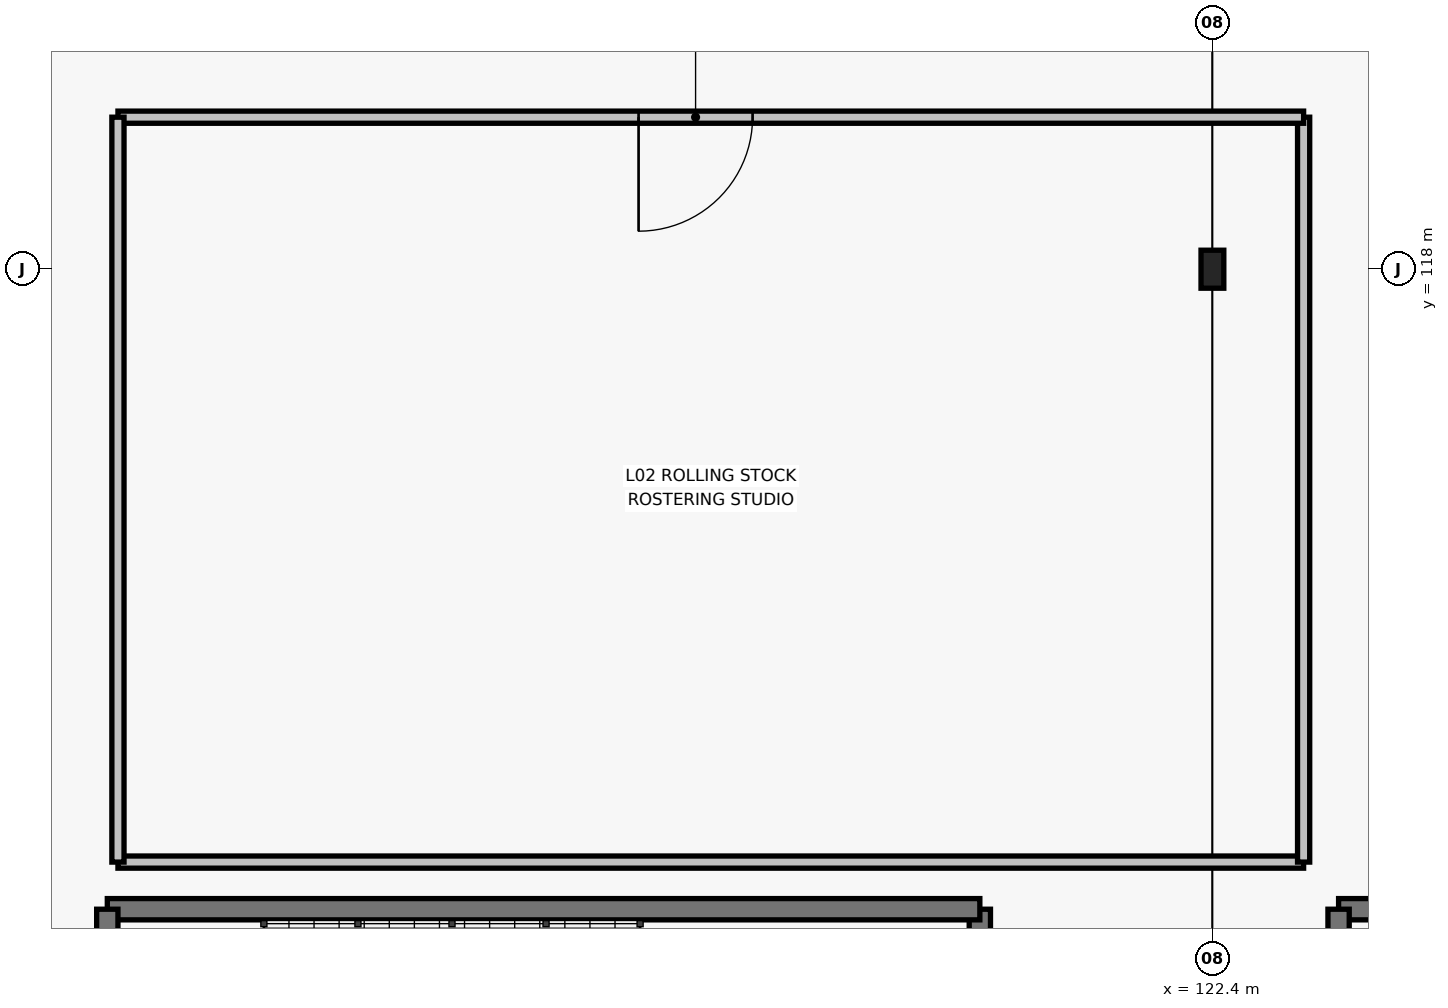
"""IFC4 building model, lengths in metres.
Left out: names, types, materials, properties, quantities, classifications, styles, units other than length and angle.
Written with IfcOpenShell. Run it as: python <this file> out.ifc"""

import sys

from ifc_helpers import new_model, si_unit, direction, frame, frame_2d, origin, origin_2d, place, context, subcontext, project, spatial, rectangle, i_section, extrude, element, fill, save


model = new_model("IFC4")
c1 = context("Model", 3, precision=1e-05, world=origin(), true_north=direction((0.0, 1.0)))
c2 = subcontext(c1, "Body", "Model", "MODEL_VIEW")
j1 = project(units=[si_unit("LENGTHUNIT", "METRE"), si_unit("PLANEANGLEUNIT", "RADIAN")], contexts=[c1])
p1 = place(None, origin())
s1 = spatial("IfcSite", under=j1, at=p1, CompositionType="ELEMENT")
p2 = place(p1, origin())
s2 = spatial("IfcBuilding", under=s1, at=p2, CompositionType="ELEMENT")
p3 = place(p2, frame((0.0, 0.0, 10.8)))
s3 = spatial("IfcBuildingStorey", under=s2, at=p3, CompositionType="ELEMENT", Elevation=10.8)
p4 = place(p3, frame((122.4, 118.0, 0.0), z_axis=(0.0, 0.0, 1.0), x_axis=(1.0, 0.0, 0.0)))
e1 = element("IfcColumn", 1, at=p4, inside=s3, PredefinedType="COLUMN", context=c2, shape_type="SweptSolid", body=[
    extrude(i_section(OverallWidth=0.3, OverallDepth=0.5, WebThickness=0.014, FlangeThickness=0.028, FilletRadius=0.027, at=origin_2d()), origin(), (0.0, 0.0, 1.0), 6.0),
])
p5 = place(p3, frame((119.34, 105.26, 0.0), z_axis=(0.0, 0.0, 1.0), x_axis=(0.0, 1.0, 0.0)))
e2 = element("IfcWall", 2, at=p5, inside=s3, PredefinedType="SHEAR", context=c2, shape_type="SweptSolid", body=[
    extrude(rectangle(XDim=4.32, YDim=0.28, at=frame_2d((2.16, 0.0))), origin(), (0.0, 0.0, 1.0), 5.8),
])
p6 = place(p3, frame((119.34, 109.58, 0.0), z_axis=(0.0, 0.0, 1.0), x_axis=(-1.0, 0.0, 0.0)))
e3 = element("IfcWall", 3, at=p6, inside=s3, PredefinedType="SHEAR", context=c2, shape_type="SweptSolid", body=[
    extrude(rectangle(XDim=11.48, YDim=0.28, at=frame_2d((5.74, 0.0))), origin(), (0.0, 0.0, 1.0), 5.8),
])
p7 = place(p3, frame((107.86, 109.58, 0.0), z_axis=(0.0, 0.0, 1.0), x_axis=(0.0, -1.0, 0.0)))
e4 = element("IfcWall", 4, at=p7, inside=s3, PredefinedType="SHEAR", context=c2, shape_type="SweptSolid", body=[
    extrude(rectangle(XDim=4.32, YDim=0.28, at=frame_2d((2.16, 0.0))), origin(), (0.0, 0.0, 1.0), 5.8),
])
p8 = place(p7, frame((1.585, 0.0, 0.0)))
e5 = element("IfcOpeningElement", 5, at=p8, cuts=e4, PredefinedType="OPENING", context=c2, shape_type="SweptSolid", body=[
    extrude(rectangle(XDim=1.15, YDim=2.2, at=frame_2d((0.575, 1.1))), frame((0.0, 0.15, 0.0), z_axis=(0.0, -1.0, 0.0), x_axis=(1.0, 0.0, 0.0)), (0.0, 0.0, 1.0), 0.3),
])
p9 = place(p3, frame((135.54, 109.58, 0.0), z_axis=(0.0, 0.0, 1.0), x_axis=(-1.0, 0.0, 0.0)))
e6 = element("IfcWall", 6, at=p9, inside=s3, PredefinedType="SHEAR", context=c2, shape_type="SweptSolid", body=[
    extrude(rectangle(XDim=11.48, YDim=0.28, at=frame_2d((5.74, 0.0))), origin(), (0.0, 0.0, 1.0), 5.8),
])
p10 = place(p3, frame((124.06, 109.58, 0.0), z_axis=(0.0, 0.0, 1.0), x_axis=(0.0, -1.0, 0.0)))
e7 = element("IfcWall", 7, at=p10, inside=s3, PredefinedType="SHEAR", context=c2, shape_type="SweptSolid", body=[
    extrude(rectangle(XDim=4.32, YDim=0.28, at=frame_2d((2.16, 0.0))), origin(), (0.0, 0.0, 1.0), 5.8),
])
p11 = place(p10, frame((1.585, 0.0, 0.0)))
e8 = element("IfcOpeningElement", 8, at=p11, cuts=e7, PredefinedType="OPENING", context=c2, shape_type="SweptSolid", body=[
    extrude(rectangle(XDim=1.15, YDim=2.2, at=frame_2d((0.575, 1.1))), frame((0.0, 0.15, 0.0), z_axis=(0.0, -1.0, 0.0), x_axis=(1.0, 0.0, 0.0)), (0.0, 0.0, 1.0), 0.3),
])
p12 = place(p3, frame((108.0, 110.2, 0.0), z_axis=(0.0, 0.0, 1.0), x_axis=(1.0, 0.0, 0.0)))
e9 = element("IfcWall", 9, at=p12, inside=s3, PredefinedType="PARTITIONING", context=c2, shape_type="SweptSolid", body=[
    extrude(rectangle(XDim=15.6, YDim=0.16, at=frame_2d((7.8, 0.0))), origin(), (0.0, 0.0, 1.0), 5.8),
])
p13 = place(p3, frame((123.6, 110.2, 0.0), z_axis=(0.0, 0.0, 1.0), x_axis=(0.0, 1.0, 0.0)))
e10 = element("IfcWall", 10, at=p13, inside=s3, PredefinedType="PARTITIONING", context=c2, shape_type="SweptSolid", body=[
    extrude(rectangle(XDim=9.8, YDim=0.16, at=frame_2d((4.9, 0.0))), origin(), (0.0, 0.0, 1.0), 5.8),
])
p14 = place(p3, frame((123.6, 120.0, 0.0), z_axis=(0.0, 0.0, 1.0), x_axis=(-1.0, 0.0, 0.0)))
e11 = element("IfcWall", 11, at=p14, inside=s3, PredefinedType="PARTITIONING", context=c2, shape_type="SweptSolid", body=[
    extrude(rectangle(XDim=15.6, YDim=0.16, at=frame_2d((7.8, 0.0))), origin(), (0.0, 0.0, 1.0), 5.8),
])
p15 = place(p14, frame((8.75, 0.0, 0.0), z_axis=(0.0, 0.0, 1.0), x_axis=(-1.0, 0.0, 0.0)))
e12 = element("IfcOpeningElement", 12, at=p15, cuts=e11, PredefinedType="OPENING", context=c2, shape_type="SweptSolid", body=[
    extrude(rectangle(XDim=1.5, YDim=2.25, at=frame_2d((0.75, 1.125))), frame((0.0, 0.09, 0.0), z_axis=(0.0, -1.0, 0.0), x_axis=(1.0, 0.0, 0.0)), (0.0, 0.0, 1.0), 0.18),
])
p16 = place(p3, frame((108.0, 120.0, 0.0), z_axis=(0.0, 0.0, 1.0), x_axis=(0.0, -1.0, 0.0)))
e13 = element("IfcWall", 13, at=p16, inside=s3, PredefinedType="PARTITIONING", context=c2, shape_type="SweptSolid", body=[
    extrude(rectangle(XDim=9.8, YDim=0.16, at=frame_2d((4.9, 0.0))), origin(), (0.0, 0.0, 1.0), 5.8),
])
p17 = place(p15, origin())
e14 = element("IfcDoor", 14, at=p17, inside=s3, OperationType="SINGLE_SWING_RIGHT", PredefinedType="DOOR", context=c2, shape_type="SweptSolid", body=[
    extrude(rectangle(XDim=1.5, YDim=2.25, at=frame_2d((0.75, 1.125))), frame((0.0, 0.025, 0.0), z_axis=(0.0, -1.0, 0.0), x_axis=(1.0, 0.0, 0.0)), (0.0, 0.0, 1.0), 0.05),
])
fill(e12, e14)
save(model, sys.argv[1])
